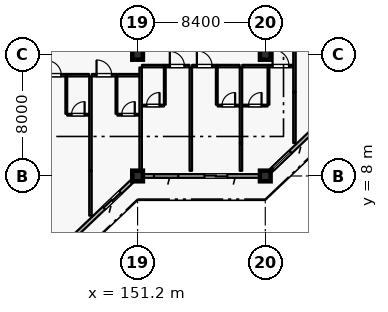
"""IFC4 building model, lengths in metres.
Left out: names, types, materials, properties, quantities, classifications, styles, units other than length and angle.
Written with IfcOpenShell. Run it as: python <this file> out.ifc"""

import sys

from ifc_helpers import new_model, si_unit, direction, frame, frame_2d, origin, origin_2d, place, context, subcontext, project, spatial, rectangle, extrude, element, fill, save


model = new_model("IFC4")
c1 = context("Model", 3, precision=1e-05, world=origin(), true_north=direction((0.0, 1.0)))
c2 = subcontext(c1, "Body", "Model", "MODEL_VIEW")
j1 = project(units=[si_unit("LENGTHUNIT", "METRE"), si_unit("PLANEANGLEUNIT", "RADIAN")], contexts=[c1])
p1 = place(None, origin())
s1 = spatial("IfcSite", under=j1, at=p1, CompositionType="ELEMENT")
p2 = place(p1, origin())
s2 = spatial("IfcBuilding", under=s1, at=p2, CompositionType="ELEMENT")
p3 = place(p2, frame((0.0, 0.0, 28.8)))
s3 = spatial("IfcBuildingStorey", under=s2, at=p3, CompositionType="ELEMENT", Elevation=28.8)
for number, where, z_axis, x_axis in (
    (1, (151.2, 8.0, 0.0), (0.0, 0.0, 1.0), (1.0, 0.0, 0.0)),
    (2, (159.6, 8.0, 0.0), (0.0, 0.0, 1.0), (1.0, 0.0, 0.0)),
    (3, (151.2, 16.0, 0.0), (0.0, 0.0, 1.0), (1.0, 0.0, 0.0)),
    (4, (159.6, 16.0, 0.0), (0.0, 0.0, 1.0), (1.0, 0.0, 0.0)),
):
    element("IfcColumn", number, at=place(p3, frame(where, z_axis=z_axis, x_axis=x_axis)), inside=s3, PredefinedType="COLUMN", context=c2, shape_type="SweptSolid", body=[
        extrude(rectangle(XDim=0.7, YDim=0.7, at=origin_2d()), origin(), (0.0, 0.0, 1.0), 3.6),
    ])
p4 = place(p3, frame((150.85, 7.667, 0.0), z_axis=(0.0, 0.0, 1.0), x_axis=(-0.724116091282, -0.689678103427, 0.0)))
e5 = element("IfcWall", 5, at=p4, inside=s3, PredefinedType="SOLIDWALL", context=c2, shape_type="SweptSolid", body=[
    extrude(rectangle(XDim=10.634, YDim=0.24, at=frame_2d((5.317, 0.0))), origin(), (0.0, 0.0, 1.0), 2.93),
])
p5 = place(p4, frame((1.08, 0.0, 0.0)))
e6 = element("IfcOpeningElement", 6, at=p5, cuts=e5, PredefinedType="OPENING", context=c2, shape_type="SweptSolid", body=[
    extrude(rectangle(XDim=1.5, YDim=2.25, at=frame_2d((0.75, 1.125))), frame((0.0, 0.13, 0.0), z_axis=(0.0, -1.0, 0.0), x_axis=(1.0, 0.0, 0.0)), (0.0, 0.0, 1.0), 0.26),
])
p6 = place(p4, frame((5.276, 0.0, 0.8)))
e7 = element("IfcOpeningElement", 7, at=p6, cuts=e5, PredefinedType="OPENING", context=c2, shape_type="SweptSolid", body=[
    extrude(rectangle(XDim=1.6, YDim=1.6, at=frame_2d((0.8, 0.8))), frame((0.0, 0.13, 0.0), z_axis=(0.0, -1.0, 0.0), x_axis=(1.0, 0.0, 0.0)), (0.0, 0.0, 1.0), 0.26),
])
p7 = place(p4, frame((8.764, 0.0, 0.8)))
e8 = element("IfcOpeningElement", 8, at=p7, cuts=e5, PredefinedType="OPENING", context=c2, shape_type="SweptSolid", body=[
    extrude(rectangle(XDim=1.6, YDim=1.6, at=frame_2d((0.8, 0.8))), frame((0.0, 0.13, 0.0), z_axis=(0.0, -1.0, 0.0), x_axis=(1.0, 0.0, 0.0)), (0.0, 0.0, 1.0), 0.26),
])
p8 = place(p3, frame((159.25, 8.0, 0.0), z_axis=(0.0, 0.0, 1.0), x_axis=(-1.0, 0.0, 0.0)))
e9 = element("IfcWall", 9, at=p8, inside=s3, PredefinedType="SOLIDWALL", context=c2, shape_type="SweptSolid", body=[
    extrude(rectangle(XDim=7.7, YDim=0.24, at=frame_2d((3.85, 0.0))), origin(), (0.0, 0.0, 1.0), 2.93),
])
p9 = place(p8, frame((2.15, 0.0, 0.0)))
e10 = element("IfcOpeningElement", 10, at=p9, cuts=e9, PredefinedType="OPENING", context=c2, shape_type="SweptSolid", body=[
    extrude(rectangle(XDim=1.5, YDim=2.25, at=frame_2d((0.75, 1.125))), frame((0.0, 0.13, 0.0), z_axis=(0.0, -1.0, 0.0), x_axis=(1.0, 0.0, 0.0)), (0.0, 0.0, 1.0), 0.26),
])
p10 = place(p8, frame((5.375, 0.0, 0.8)))
e11 = element("IfcOpeningElement", 11, at=p10, cuts=e9, PredefinedType="OPENING", context=c2, shape_type="SweptSolid", body=[
    extrude(rectangle(XDim=1.6, YDim=1.6, at=frame_2d((0.8, 0.8))), frame((0.0, 0.13, 0.0), z_axis=(0.0, -1.0, 0.0), x_axis=(1.0, 0.0, 0.0)), (0.0, 0.0, 1.0), 0.26),
])
p11 = place(p3, frame((167.65, 15.667, 0.0), z_axis=(0.0, 0.0, 1.0), x_axis=(-0.724105170588, -0.689689569247, 0.0)))
e12 = element("IfcWall", 12, at=p11, inside=s3, PredefinedType="SOLIDWALL", context=c2, shape_type="SweptSolid", body=[
    extrude(rectangle(XDim=10.634, YDim=0.24, at=frame_2d((5.317, 0.0))), origin(), (0.0, 0.0, 1.0), 2.93),
])
p12 = place(p11, frame((0.983, 0.0, 0.0)))
e13 = element("IfcOpeningElement", 13, at=p12, cuts=e12, PredefinedType="OPENING", context=c2, shape_type="SweptSolid", body=[
    extrude(rectangle(XDim=1.5, YDim=2.25, at=frame_2d((0.75, 1.125))), frame((0.0, 0.13, 0.0), z_axis=(0.0, -1.0, 0.0), x_axis=(1.0, 0.0, 0.0)), (0.0, 0.0, 1.0), 0.26),
])
p13 = place(p11, frame((5.035, 0.0, 0.8)))
e14 = element("IfcOpeningElement", 14, at=p13, cuts=e12, PredefinedType="OPENING", context=c2, shape_type="SweptSolid", body=[
    extrude(rectangle(XDim=2.0, YDim=1.75, at=frame_2d((1.0, 0.875))), frame((0.0, 0.13, 0.0), z_axis=(0.0, -1.0, 0.0), x_axis=(1.0, 0.0, 0.0)), (0.0, 0.0, 1.0), 0.26),
])
p14 = place(p11, frame((8.819, 0.0, 0.8)))
e15 = element("IfcOpeningElement", 15, at=p14, cuts=e12, PredefinedType="OPENING", context=c2, shape_type="SweptSolid", body=[
    extrude(rectangle(XDim=1.6, YDim=1.6, at=frame_2d((0.8, 0.8))), frame((0.0, 0.13, 0.0), z_axis=(0.0, -1.0, 0.0), x_axis=(1.0, 0.0, 0.0)), (0.0, 0.0, 1.0), 0.26),
])
p15 = place(p3, frame((144.89, 14.63, 0.0), z_axis=(0.0, 0.0, 1.0), x_axis=(1.0, 0.0, 0.0)))
e16 = element("IfcWall", 16, at=p15, inside=s3, PredefinedType="PARTITIONING", context=c2, shape_type="SweptSolid", body=[
    extrude(rectangle(XDim=1.62, YDim=0.16, at=frame_2d((0.81, 0.0))), origin(), (0.0, 0.0, 1.0), 3.365),
])
p16 = place(p15, frame((0.33, 0.0, 0.0)))
e17 = element("IfcOpeningElement", 17, at=p16, cuts=e16, PredefinedType="OPENING", context=c2, shape_type="SweptSolid", body=[
    extrude(rectangle(XDim=0.96, YDim=2.2, at=frame_2d((0.48, 1.1))), frame((0.0, 0.09, 0.0), z_axis=(0.0, -1.0, 0.0), x_axis=(1.0, 0.0, 0.0)), (0.0, 0.0, 1.0), 0.18),
])
p17 = place(p3, frame((146.52, 14.63, 0.0), z_axis=(0.0, 0.0, 1.0), x_axis=(1.0, 0.0, 0.0)))
e18 = element("IfcWall", 18, at=p17, inside=s3, PredefinedType="PARTITIONING", context=c2, shape_type="SweptSolid", body=[
    extrude(rectangle(XDim=1.49, YDim=0.16, at=frame_2d((0.745, 0.0))), origin(), (0.0, 0.0, 1.0), 3.365),
])
p18 = place(p3, frame((146.51, 12.09, 0.0), z_axis=(0.0, 0.0, 1.0), x_axis=(0.0, 1.0, 0.0)))
e19 = element("IfcWall", 19, at=p18, inside=s3, PredefinedType="PARTITIONING", context=c2, shape_type="SweptSolid", body=[
    extrude(rectangle(XDim=2.45, YDim=0.115, at=frame_2d((1.225, 0.0))), origin(), (0.0, 0.0, 1.0), 3.365),
])
p19 = place(p3, frame((146.57, 12.03, 0.0), z_axis=(0.0, 0.0, 1.0), x_axis=(1.0, 0.0, 0.0)))
e20 = element("IfcWall", 20, at=p19, inside=s3, PredefinedType="PARTITIONING", context=c2, shape_type="SweptSolid", body=[
    extrude(rectangle(XDim=1.43, YDim=0.115, at=frame_2d((0.715, 0.0))), origin(), (0.0, 0.0, 1.0), 3.365),
])
p20 = place(p19, frame((0.285, 0.0, 0.0)))
e21 = element("IfcOpeningElement", 21, at=p20, cuts=e20, PredefinedType="OPENING", context=c2, shape_type="SweptSolid", body=[
    extrude(rectangle(XDim=0.86, YDim=2.12, at=frame_2d((0.43, 1.06))), frame((0.0, 0.067, 0.0), z_axis=(0.0, -1.0, 0.0), x_axis=(1.0, 0.0, 0.0)), (0.0, 0.0, 1.0), 0.135),
])
p21 = place(p3, frame((148.1, 5.39, 0.0), z_axis=(0.0, 0.0, 1.0), x_axis=(0.0, 1.0, 0.0)))
e22 = element("IfcWall", 22, at=p21, inside=s3, PredefinedType="PARTITIONING", context=c2, shape_type="SweptSolid", body=[
    extrude(rectangle(XDim=2.94, YDim=0.16, at=frame_2d((1.47, 0.0))), origin(), (0.0, 0.0, 1.0), 3.365),
])
p22 = place(p3, frame((148.19, 14.63, 0.0), z_axis=(0.0, 0.0, 1.0), x_axis=(1.0, 0.0, 0.0)))
e23 = element("IfcWall", 23, at=p22, inside=s3, PredefinedType="PARTITIONING", context=c2, shape_type="SweptSolid", body=[
    extrude(rectangle(XDim=1.62, YDim=0.16, at=frame_2d((0.81, 0.0))), origin(), (0.0, 0.0, 1.0), 3.365),
])
p23 = place(p22, frame((0.31, 0.0, 0.0)))
e24 = element("IfcOpeningElement", 24, at=p23, cuts=e23, PredefinedType="OPENING", context=c2, shape_type="SweptSolid", body=[
    extrude(rectangle(XDim=1.0, YDim=2.25, at=frame_2d((0.5, 1.125))), frame((0.0, 0.09, 0.0), z_axis=(0.0, -1.0, 0.0), x_axis=(1.0, 0.0, 0.0)), (0.0, 0.0, 1.0), 0.18),
])
p24 = place(p3, frame((149.82, 14.63, 0.0), z_axis=(0.0, 0.0, 1.0), x_axis=(1.0, 0.0, 0.0)))
e25 = element("IfcWall", 25, at=p24, inside=s3, PredefinedType="PARTITIONING", context=c2, shape_type="SweptSolid", body=[
    extrude(rectangle(XDim=1.49, YDim=0.16, at=frame_2d((0.745, 0.0))), origin(), (0.0, 0.0, 1.0), 3.365),
])
p25 = place(p3, frame((149.81, 12.09, 0.0), z_axis=(0.0, 0.0, 1.0), x_axis=(0.0, 1.0, 0.0)))
e26 = element("IfcWall", 26, at=p25, inside=s3, PredefinedType="PARTITIONING", context=c2, shape_type="SweptSolid", body=[
    extrude(rectangle(XDim=2.45, YDim=0.115, at=frame_2d((1.225, 0.0))), origin(), (0.0, 0.0, 1.0), 3.365),
])
p26 = place(p3, frame((149.87, 12.03, 0.0), z_axis=(0.0, 0.0, 1.0), x_axis=(1.0, 0.0, 0.0)))
e27 = element("IfcWall", 27, at=p26, inside=s3, PredefinedType="PARTITIONING", context=c2, shape_type="SweptSolid", body=[
    extrude(rectangle(XDim=1.43, YDim=0.115, at=frame_2d((0.715, 0.0))), origin(), (0.0, 0.0, 1.0), 3.365),
])
p27 = place(p26, frame((0.285, 0.0, 0.0)))
e28 = element("IfcOpeningElement", 28, at=p27, cuts=e27, PredefinedType="OPENING", context=c2, shape_type="SweptSolid", body=[
    extrude(rectangle(XDim=0.86, YDim=2.12, at=frame_2d((0.43, 1.06))), frame((0.0, 0.067, 0.0), z_axis=(0.0, -1.0, 0.0), x_axis=(1.0, 0.0, 0.0)), (0.0, 0.0, 1.0), 0.135),
])
p28 = place(p3, frame((148.1, 8.34, 0.0), z_axis=(0.0, 0.0, 1.0), x_axis=(0.0, 1.0, 0.0)))
e29 = element("IfcWall", 29, at=p28, inside=s3, PredefinedType="PARTITIONING", context=c2, shape_type="SweptSolid", body=[
    extrude(rectangle(XDim=6.2, YDim=0.16, at=frame_2d((3.1, 0.0))), origin(), (0.0, 0.0, 1.0), 3.365),
])
p29 = place(p3, frame((151.49, 15.23, 0.0), z_axis=(0.0, 0.0, 1.0), x_axis=(1.0, 0.0, 0.0)))
e30 = element("IfcWall", 30, at=p29, inside=s3, PredefinedType="PARTITIONING", context=c2, shape_type="SweptSolid", body=[
    extrude(rectangle(XDim=1.49, YDim=0.16, at=frame_2d((0.745, 0.0))), origin(), (0.0, 0.0, 1.0), 3.365),
])
p30 = place(p3, frame((152.99, 15.23, 0.0), z_axis=(0.0, 0.0, 1.0), x_axis=(1.0, 0.0, 0.0)))
e31 = element("IfcWall", 31, at=p30, inside=s3, PredefinedType="PARTITIONING", context=c2, shape_type="SweptSolid", body=[
    extrude(rectangle(XDim=1.62, YDim=0.16, at=frame_2d((0.81, 0.0))), origin(), (0.0, 0.0, 1.0), 3.365),
])
p31 = place(p30, frame((0.33, 0.0, 0.0)))
e32 = element("IfcOpeningElement", 32, at=p31, cuts=e31, PredefinedType="OPENING", context=c2, shape_type="SweptSolid", body=[
    extrude(rectangle(XDim=0.96, YDim=2.2, at=frame_2d((0.48, 1.1))), frame((0.0, 0.09, 0.0), z_axis=(0.0, -1.0, 0.0), x_axis=(1.0, 0.0, 0.0)), (0.0, 0.0, 1.0), 0.18),
])
p32 = place(p3, frame((152.99, 12.69, 0.0), z_axis=(0.0, 0.0, 1.0), x_axis=(0.0, 1.0, 0.0)))
e33 = element("IfcWall", 33, at=p32, inside=s3, PredefinedType="PARTITIONING", context=c2, shape_type="SweptSolid", body=[
    extrude(rectangle(XDim=2.45, YDim=0.115, at=frame_2d((1.225, 0.0))), origin(), (0.0, 0.0, 1.0), 3.365),
])
p33 = place(p3, frame((151.5, 12.63, 0.0), z_axis=(0.0, 0.0, 1.0), x_axis=(1.0, 0.0, 0.0)))
e34 = element("IfcWall", 34, at=p33, inside=s3, PredefinedType="PARTITIONING", context=c2, shape_type="SweptSolid", body=[
    extrude(rectangle(XDim=1.43, YDim=0.115, at=frame_2d((0.715, 0.0))), origin(), (0.0, 0.0, 1.0), 3.365),
])
p34 = place(p33, frame((0.285, 0.0, 0.0)))
e35 = element("IfcOpeningElement", 35, at=p34, cuts=e34, PredefinedType="OPENING", context=c2, shape_type="SweptSolid", body=[
    extrude(rectangle(XDim=0.86, YDim=2.12, at=frame_2d((0.43, 1.06))), frame((0.0, 0.067, 0.0), z_axis=(0.0, -1.0, 0.0), x_axis=(1.0, 0.0, 0.0)), (0.0, 0.0, 1.0), 0.135),
])
p35 = place(p3, frame((151.4, 8.34, 0.0), z_axis=(0.0, 0.0, 1.0), x_axis=(0.0, 1.0, 0.0)))
e36 = element("IfcWall", 36, at=p35, inside=s3, PredefinedType="PARTITIONING", context=c2, shape_type="SweptSolid", body=[
    extrude(rectangle(XDim=6.8, YDim=0.16, at=frame_2d((3.4, 0.0))), origin(), (0.0, 0.0, 1.0), 2.73),
])
p36 = place(p3, frame((154.79, 15.23, 0.0), z_axis=(0.0, 0.0, 1.0), x_axis=(1.0, 0.0, 0.0)))
e37 = element("IfcWall", 37, at=p36, inside=s3, PredefinedType="PARTITIONING", context=c2, shape_type="SweptSolid", body=[
    extrude(rectangle(XDim=1.62, YDim=0.16, at=frame_2d((0.81, 0.0))), origin(), (0.0, 0.0, 1.0), 3.365),
])
p37 = place(p36, frame((0.31, 0.0, 0.0)))
e38 = element("IfcOpeningElement", 38, at=p37, cuts=e37, PredefinedType="OPENING", context=c2, shape_type="SweptSolid", body=[
    extrude(rectangle(XDim=1.0, YDim=2.25, at=frame_2d((0.5, 1.125))), frame((0.0, 0.09, 0.0), z_axis=(0.0, -1.0, 0.0), x_axis=(1.0, 0.0, 0.0)), (0.0, 0.0, 1.0), 0.18),
])
p38 = place(p3, frame((156.42, 15.23, 0.0), z_axis=(0.0, 0.0, 1.0), x_axis=(1.0, 0.0, 0.0)))
e39 = element("IfcWall", 39, at=p38, inside=s3, PredefinedType="PARTITIONING", context=c2, shape_type="SweptSolid", body=[
    extrude(rectangle(XDim=1.49, YDim=0.16, at=frame_2d((0.745, 0.0))), origin(), (0.0, 0.0, 1.0), 3.365),
])
p39 = place(p3, frame((156.41, 12.69, 0.0), z_axis=(0.0, 0.0, 1.0), x_axis=(0.0, 1.0, 0.0)))
e40 = element("IfcWall", 40, at=p39, inside=s3, PredefinedType="PARTITIONING", context=c2, shape_type="SweptSolid", body=[
    extrude(rectangle(XDim=2.45, YDim=0.115, at=frame_2d((1.225, 0.0))), origin(), (0.0, 0.0, 1.0), 3.365),
])
p40 = place(p3, frame((156.47, 12.63, 0.0), z_axis=(0.0, 0.0, 1.0), x_axis=(1.0, 0.0, 0.0)))
e41 = element("IfcWall", 41, at=p40, inside=s3, PredefinedType="PARTITIONING", context=c2, shape_type="SweptSolid", body=[
    extrude(rectangle(XDim=1.43, YDim=0.115, at=frame_2d((0.715, 0.0))), origin(), (0.0, 0.0, 1.0), 3.365),
])
p41 = place(p40, frame((0.285, 0.0, 0.0)))
e42 = element("IfcOpeningElement", 42, at=p41, cuts=e41, PredefinedType="OPENING", context=c2, shape_type="SweptSolid", body=[
    extrude(rectangle(XDim=0.86, YDim=2.12, at=frame_2d((0.43, 1.06))), frame((0.0, 0.067, 0.0), z_axis=(0.0, -1.0, 0.0), x_axis=(1.0, 0.0, 0.0)), (0.0, 0.0, 1.0), 0.135),
])
p42 = place(p3, frame((154.7, 8.34, 0.0), z_axis=(0.0, 0.0, 1.0), x_axis=(0.0, 1.0, 0.0)))
e43 = element("IfcWall", 43, at=p42, inside=s3, PredefinedType="PARTITIONING", context=c2, shape_type="SweptSolid", body=[
    extrude(rectangle(XDim=6.8, YDim=0.16, at=frame_2d((3.4, 0.0))), origin(), (0.0, 0.0, 1.0), 3.365),
])
p43 = place(p3, frame((158.0, 8.34, 0.0), z_axis=(0.0, 0.0, 1.0), x_axis=(0.0, 1.0, 0.0)))
e44 = element("IfcWall", 44, at=p43, inside=s3, PredefinedType="PARTITIONING", context=c2, shape_type="SweptSolid", body=[
    extrude(rectangle(XDim=1.82, YDim=0.16, at=frame_2d((0.91, 0.0))), origin(), (0.0, 0.0, 1.0), 3.365),
])
p44 = place(p3, frame((158.09, 15.23, 0.0), z_axis=(0.0, 0.0, 1.0), x_axis=(1.0, 0.0, 0.0)))
e45 = element("IfcWall", 45, at=p44, inside=s3, PredefinedType="PARTITIONING", context=c2, shape_type="SweptSolid", body=[
    extrude(rectangle(XDim=1.71, YDim=0.16, at=frame_2d((0.855, 0.0))), origin(), (0.0, 0.0, 1.0), 3.365),
])
p45 = place(p3, frame((159.81, 15.23, 0.0), z_axis=(0.0, 0.0, 1.0), x_axis=(1.0, 0.0, 0.0)))
e46 = element("IfcWall", 46, at=p45, inside=s3, PredefinedType="PARTITIONING", context=c2, shape_type="SweptSolid", body=[
    extrude(rectangle(XDim=1.62, YDim=0.16, at=frame_2d((0.81, 0.0))), origin(), (0.0, 0.0, 1.0), 3.365),
])
p46 = place(p45, frame((0.27, 0.0, 0.0)))
e47 = element("IfcOpeningElement", 47, at=p46, cuts=e46, PredefinedType="OPENING", context=c2, shape_type="SweptSolid", body=[
    extrude(rectangle(XDim=1.08, YDim=2.3, at=frame_2d((0.54, 1.15))), frame((0.0, 0.09, 0.0), z_axis=(0.0, -1.0, 0.0), x_axis=(1.0, 0.0, 0.0)), (0.0, 0.0, 1.0), 0.18),
])
p47 = place(p3, frame((159.81, 12.69, 0.0), z_axis=(0.0, 0.0, 1.0), x_axis=(0.0, 1.0, 0.0)))
e48 = element("IfcWall", 48, at=p47, inside=s3, PredefinedType="PARTITIONING", context=c2, shape_type="SweptSolid", body=[
    extrude(rectangle(XDim=2.45, YDim=0.115, at=frame_2d((1.225, 0.0))), origin(), (0.0, 0.0, 1.0), 2.73),
])
p48 = place(p3, frame((158.1, 12.63, 0.0), z_axis=(0.0, 0.0, 1.0), x_axis=(1.0, 0.0, 0.0)))
e49 = element("IfcWall", 49, at=p48, inside=s3, PredefinedType="PARTITIONING", context=c2, shape_type="SweptSolid", body=[
    extrude(rectangle(XDim=1.65, YDim=0.115, at=frame_2d((0.825, 0.0))), origin(), (0.0, 0.0, 1.0), 3.365),
])
p49 = place(p48, frame((0.395, 0.0, 0.0)))
e50 = element("IfcOpeningElement", 50, at=p49, cuts=e49, PredefinedType="OPENING", context=c2, shape_type="SweptSolid", body=[
    extrude(rectangle(XDim=0.86, YDim=2.12, at=frame_2d((0.43, 1.06))), frame((0.0, 0.067, 0.0), z_axis=(0.0, -1.0, 0.0), x_axis=(1.0, 0.0, 0.0)), (0.0, 0.0, 1.0), 0.135),
])
p50 = place(p3, frame((158.0, 10.17, 0.0), z_axis=(0.0, 0.0, 1.0), x_axis=(0.0, 1.0, 0.0)))
e51 = element("IfcWall", 51, at=p50, inside=s3, PredefinedType="PARTITIONING", context=c2, shape_type="SweptSolid", body=[
    extrude(rectangle(XDim=4.97, YDim=0.16, at=frame_2d((2.485, 0.0))), origin(), (0.0, 0.0, 1.0), 3.365),
])
p51 = place(p3, frame((161.52, 10.17, 0.0), z_axis=(0.0, 0.0, 1.0), x_axis=(0.0, 1.0, 0.0)))
e52 = element("IfcWall", 52, at=p51, inside=s3, PredefinedType="PARTITIONING", context=c2, shape_type="SweptSolid", body=[
    extrude(rectangle(XDim=3.34, YDim=0.16, at=frame_2d((1.67, 0.0))), origin(), (0.0, 0.0, 1.0), 3.365),
])
p52 = place(p3, frame((161.52, 13.52, 0.0), z_axis=(0.0, 0.0, 1.0), x_axis=(0.0, 1.0, 0.0)))
e53 = element("IfcWall", 53, at=p52, inside=s3, PredefinedType="PARTITIONING", context=c2, shape_type="SweptSolid", body=[
    extrude(rectangle(XDim=9.55, YDim=0.16, at=frame_2d((4.775, 0.0))), origin(), (0.0, 0.0, 1.0), 3.365),
])
p53 = place(p5, origin())
e54 = element("IfcDoor", 54, at=p53, inside=s3, OperationType="SLIDING_TO_LEFT", PredefinedType="DOOR", context=c2, shape_type="SweptSolid", body=[
    extrude(rectangle(XDim=1.5, YDim=2.25, at=frame_2d((0.75, 1.125))), frame((0.0, 0.025, 0.0), z_axis=(0.0, -1.0, 0.0), x_axis=(1.0, 0.0, 0.0)), (0.0, 0.0, 1.0), 0.05),
])
fill(e6, e54)
p54 = place(p9, origin())
e55 = element("IfcDoor", 55, at=p54, inside=s3, OperationType="SLIDING_TO_LEFT", PredefinedType="DOOR", context=c2, shape_type="SweptSolid", body=[
    extrude(rectangle(XDim=1.5, YDim=2.25, at=frame_2d((0.75, 1.125))), frame((0.0, 0.025, 0.0), z_axis=(0.0, -1.0, 0.0), x_axis=(1.0, 0.0, 0.0)), (0.0, 0.0, 1.0), 0.05),
])
fill(e10, e55)
p55 = place(p10, origin())
e56 = element("IfcWindow", 56, at=p55, inside=s3, PartitioningType="SINGLE_PANEL", PredefinedType="WINDOW", context=c2, shape_type="SweptSolid", body=[
    extrude(rectangle(XDim=1.6, YDim=1.6, at=frame_2d((0.8, 0.8))), frame((0.0, 0.03, 0.0), z_axis=(0.0, -1.0, 0.0), x_axis=(1.0, 0.0, 0.0)), (0.0, 0.0, 1.0), 0.06),
])
fill(e11, e56)
p56 = place(p14, origin())
e57 = element("IfcWindow", 57, at=p56, inside=s3, PartitioningType="SINGLE_PANEL", PredefinedType="WINDOW", context=c2, shape_type="SweptSolid", body=[
    extrude(rectangle(XDim=1.6, YDim=1.6, at=frame_2d((0.8, 0.8))), frame((0.0, 0.03, 0.0), z_axis=(0.0, -1.0, 0.0), x_axis=(1.0, 0.0, 0.0)), (0.0, 0.0, 1.0), 0.06),
])
fill(e15, e57)
p57 = place(p16, origin())
e58 = element("IfcDoor", 58, at=p57, inside=s3, OperationType="SINGLE_SWING_LEFT", PredefinedType="DOOR", context=c2, shape_type="SweptSolid", body=[
    extrude(rectangle(XDim=0.96, YDim=2.2, at=frame_2d((0.48, 1.1))), frame((0.0, 0.025, 0.0), z_axis=(0.0, -1.0, 0.0), x_axis=(1.0, 0.0, 0.0)), (0.0, 0.0, 1.0), 0.05),
])
fill(e17, e58)
p58 = place(p20, origin())
e59 = element("IfcDoor", 59, at=p58, inside=s3, OperationType="SINGLE_SWING_RIGHT", PredefinedType="DOOR", context=c2, shape_type="SweptSolid", body=[
    extrude(rectangle(XDim=0.86, YDim=2.12, at=frame_2d((0.43, 1.06))), frame((0.0, 0.025, 0.0), z_axis=(0.0, -1.0, 0.0), x_axis=(1.0, 0.0, 0.0)), (0.0, 0.0, 1.0), 0.05),
])
fill(e21, e59)
p59 = place(p23, origin())
e60 = element("IfcDoor", 60, at=p59, inside=s3, OperationType="SINGLE_SWING_LEFT", PredefinedType="DOOR", context=c2, shape_type="SweptSolid", body=[
    extrude(rectangle(XDim=1.0, YDim=2.25, at=frame_2d((0.5, 1.125))), frame((0.0, 0.025, 0.0), z_axis=(0.0, -1.0, 0.0), x_axis=(1.0, 0.0, 0.0)), (0.0, 0.0, 1.0), 0.05),
])
fill(e24, e60)
p60 = place(p27, origin())
e61 = element("IfcDoor", 61, at=p60, inside=s3, OperationType="SINGLE_SWING_RIGHT", PredefinedType="DOOR", context=c2, shape_type="SweptSolid", body=[
    extrude(rectangle(XDim=0.86, YDim=2.12, at=frame_2d((0.43, 1.06))), frame((0.0, 0.025, 0.0), z_axis=(0.0, -1.0, 0.0), x_axis=(1.0, 0.0, 0.0)), (0.0, 0.0, 1.0), 0.05),
])
fill(e28, e61)
p61 = place(p31, origin())
e62 = element("IfcDoor", 62, at=p61, inside=s3, OperationType="SINGLE_SWING_LEFT", PredefinedType="DOOR", context=c2, shape_type="SweptSolid", body=[
    extrude(rectangle(XDim=0.96, YDim=2.2, at=frame_2d((0.48, 1.1))), frame((0.0, 0.025, 0.0), z_axis=(0.0, -1.0, 0.0), x_axis=(1.0, 0.0, 0.0)), (0.0, 0.0, 1.0), 0.05),
])
fill(e32, e62)
p62 = place(p34, origin())
e63 = element("IfcDoor", 63, at=p62, inside=s3, OperationType="SINGLE_SWING_RIGHT", PredefinedType="DOOR", context=c2, shape_type="SweptSolid", body=[
    extrude(rectangle(XDim=0.86, YDim=2.12, at=frame_2d((0.43, 1.06))), frame((0.0, 0.025, 0.0), z_axis=(0.0, -1.0, 0.0), x_axis=(1.0, 0.0, 0.0)), (0.0, 0.0, 1.0), 0.05),
])
fill(e35, e63)
p63 = place(p37, origin())
e64 = element("IfcDoor", 64, at=p63, inside=s3, OperationType="SINGLE_SWING_LEFT", PredefinedType="DOOR", context=c2, shape_type="SweptSolid", body=[
    extrude(rectangle(XDim=1.0, YDim=2.25, at=frame_2d((0.5, 1.125))), frame((0.0, 0.025, 0.0), z_axis=(0.0, -1.0, 0.0), x_axis=(1.0, 0.0, 0.0)), (0.0, 0.0, 1.0), 0.05),
])
fill(e38, e64)
p64 = place(p41, origin())
e65 = element("IfcDoor", 65, at=p64, inside=s3, OperationType="SINGLE_SWING_RIGHT", PredefinedType="DOOR", context=c2, shape_type="SweptSolid", body=[
    extrude(rectangle(XDim=0.86, YDim=2.12, at=frame_2d((0.43, 1.06))), frame((0.0, 0.025, 0.0), z_axis=(0.0, -1.0, 0.0), x_axis=(1.0, 0.0, 0.0)), (0.0, 0.0, 1.0), 0.05),
])
fill(e42, e65)
p65 = place(p46, origin())
e66 = element("IfcDoor", 66, at=p65, inside=s3, OperationType="SINGLE_SWING_LEFT", PredefinedType="DOOR", context=c2, shape_type="SweptSolid", body=[
    extrude(rectangle(XDim=1.08, YDim=2.3, at=frame_2d((0.54, 1.15))), frame((0.0, 0.025, 0.0), z_axis=(0.0, -1.0, 0.0), x_axis=(1.0, 0.0, 0.0)), (0.0, 0.0, 1.0), 0.05),
])
fill(e47, e66)
p66 = place(p49, origin())
e67 = element("IfcDoor", 67, at=p66, inside=s3, OperationType="SINGLE_SWING_RIGHT", PredefinedType="DOOR", context=c2, shape_type="SweptSolid", body=[
    extrude(rectangle(XDim=0.86, YDim=2.12, at=frame_2d((0.43, 1.06))), frame((0.0, 0.025, 0.0), z_axis=(0.0, -1.0, 0.0), x_axis=(1.0, 0.0, 0.0)), (0.0, 0.0, 1.0), 0.05),
])
fill(e50, e67)
save(model, sys.argv[1])
